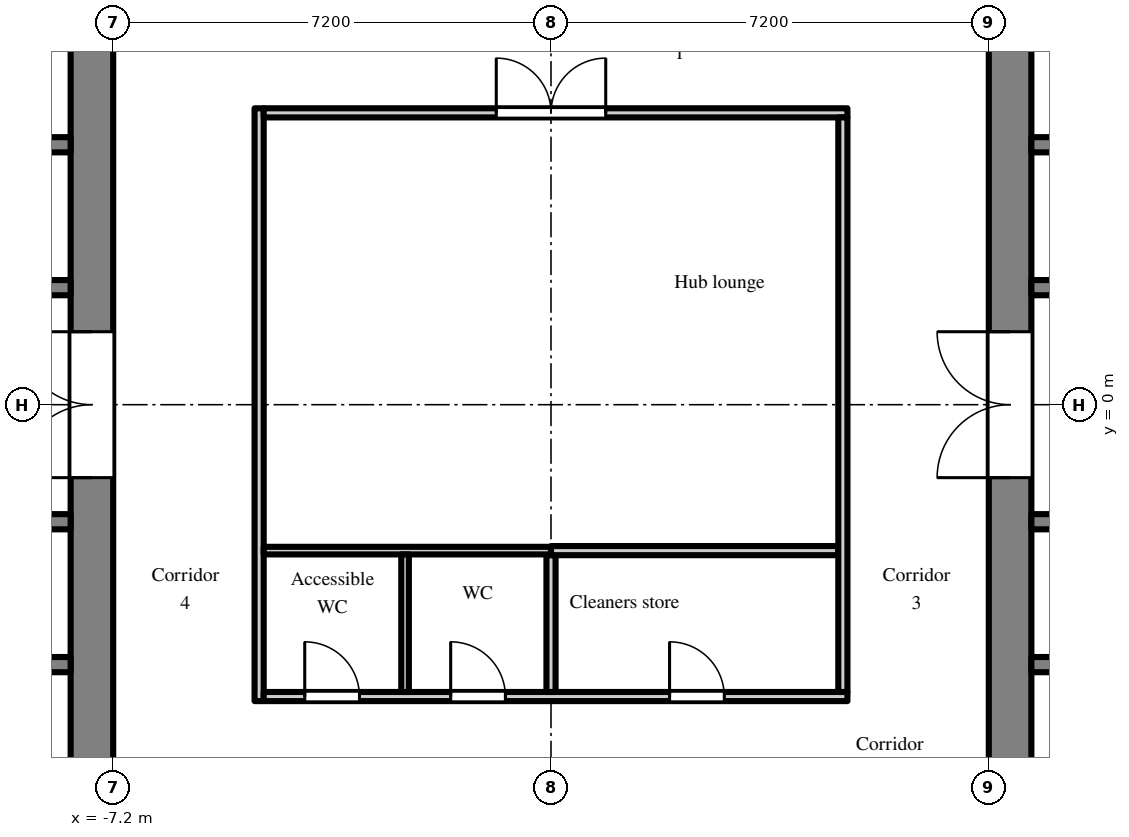
"""IFC4 building model, lengths in metres.
Left out: names, types, materials, properties, quantities, classifications, styles, units other than length and angle.
Written with IfcOpenShell. Run it as: python <this file> out.ifc"""

import sys

from ifc_helpers import new_model, si_unit, direction, frame, frame_2d, origin, place, context, subcontext, project, spatial, rectangle, extrude, element, fill, save


model = new_model("IFC4")
c1 = context("Model", 3, precision=1e-05, world=origin(), true_north=direction((0.0, 1.0)))
c2 = subcontext(c1, "Body", "Model", "MODEL_VIEW")
j1 = project(units=[si_unit("LENGTHUNIT", "METRE"), si_unit("PLANEANGLEUNIT", "RADIAN")], contexts=[c1])
p1 = place(None, origin())
s1 = spatial("IfcSite", under=j1, at=p1, CompositionType="ELEMENT")
p2 = place(p1, origin())
s2 = spatial("IfcBuilding", under=s1, at=p2, CompositionType="ELEMENT")
p3 = place(p2, frame((0.0, 0.0, 123.3)))
s3 = spatial("IfcBuildingStorey", under=s2, at=p3, CompositionType="ELEMENT", Elevation=123.3)
p4 = place(p3, frame((7.55, -7.2, 0.0), z_axis=(0.0, 0.0, 1.0), x_axis=(0.0, 1.0, 0.0)))
e1 = element("IfcWall", 1, at=p4, inside=s3, PredefinedType="SHEAR", context=c2, shape_type="SweptSolid", body=[
    extrude(rectangle(XDim=14.4, YDim=0.7, at=frame_2d((7.2, 0.0))), origin(), (0.0, 0.0, 1.0), 2.6),
])
p5 = place(p4, frame((6.0, 0.0, 0.0)))
e2 = element("IfcOpeningElement", 2, at=p5, cuts=e1, PredefinedType="OPENING", context=c2, shape_type="SweptSolid", body=[
    extrude(rectangle(XDim=2.4, YDim=2.2, at=frame_2d((1.2, 1.1))), frame((0.0, 0.36, 0.0), z_axis=(0.0, -1.0, 0.0), x_axis=(1.0, 0.0, 0.0)), (0.0, 0.0, 1.0), 0.72),
])
p6 = place(p3, frame((7.9, 1.925, 0.0), z_axis=(0.0, 0.0, 1.0), x_axis=(1.0, 0.0, 0.0)))
e3 = element("IfcWall", 3, at=p6, inside=s3, PredefinedType="SHEAR", context=c2, shape_type="SweptSolid", body=[
    extrude(rectangle(XDim=12.95, YDim=0.25, at=frame_2d((6.475, 0.0))), origin(), (0.0, 0.0, 1.0), 2.6),
])
p7 = place(p6, frame((4.825, 0.0, 0.0)))
e4 = element("IfcOpeningElement", 4, at=p7, cuts=e3, PredefinedType="OPENING", context=c2, shape_type="SweptSolid", body=[
    extrude(rectangle(XDim=1.1, YDim=2.1, at=frame_2d((0.55, 1.05))), frame((0.0, 0.135, 0.0), z_axis=(0.0, -1.0, 0.0), x_axis=(1.0, 0.0, 0.0)), (0.0, 0.0, 1.0), 0.27),
])
p8 = place(p6, frame((7.025, 0.0, 0.0)))
e5 = element("IfcOpeningElement", 5, at=p8, cuts=e3, PredefinedType="OPENING", context=c2, shape_type="SweptSolid", body=[
    extrude(rectangle(XDim=1.1, YDim=2.1, at=frame_2d((0.55, 1.05))), frame((0.0, 0.135, 0.0), z_axis=(0.0, -1.0, 0.0), x_axis=(1.0, 0.0, 0.0)), (0.0, 0.0, 1.0), 0.27),
])
p9 = place(p6, frame((9.225, 0.0, 0.0)))
e6 = element("IfcOpeningElement", 6, at=p9, cuts=e3, PredefinedType="OPENING", context=c2, shape_type="SweptSolid", body=[
    extrude(rectangle(XDim=1.1, YDim=2.1, at=frame_2d((0.55, 1.05))), frame((0.0, 0.135, 0.0), z_axis=(0.0, -1.0, 0.0), x_axis=(1.0, 0.0, 0.0)), (0.0, 0.0, 1.0), 0.27),
])
p10 = place(p6, frame((0.525, 0.0, 0.0)))
e7 = element("IfcOpeningElement", 7, at=p10, cuts=e3, PredefinedType="OPENING", context=c2, shape_type="SweptSolid", body=[
    extrude(rectangle(XDim=0.9, YDim=2.1, at=frame_2d((0.45, 1.05))), frame((0.0, 0.135, 0.0), z_axis=(0.0, -1.0, 0.0), x_axis=(1.0, 0.0, 0.0)), (0.0, 0.0, 1.0), 0.27),
])
p11 = place(p6, frame((2.625, 0.0, 0.0)))
e8 = element("IfcOpeningElement", 8, at=p11, cuts=e3, PredefinedType="OPENING", context=c2, shape_type="SweptSolid", body=[
    extrude(rectangle(XDim=1.1, YDim=2.1, at=frame_2d((0.55, 1.05))), frame((0.0, 0.135, 0.0), z_axis=(0.0, -1.0, 0.0), x_axis=(1.0, 0.0, 0.0)), (0.0, 0.0, 1.0), 0.27),
])
p12 = place(p6, frame((11.525, 0.0, 0.0)))
e9 = element("IfcOpeningElement", 9, at=p12, cuts=e3, PredefinedType="OPENING", context=c2, shape_type="SweptSolid", body=[
    extrude(rectangle(XDim=0.9, YDim=2.1, at=frame_2d((0.45, 1.05))), frame((0.0, 0.135, 0.0), z_axis=(0.0, -1.0, 0.0), x_axis=(1.0, 0.0, 0.0)), (0.0, 0.0, 1.0), 0.27),
])
p13 = place(p3, frame((7.9, 4.275, 0.0), z_axis=(0.0, 0.0, 1.0), x_axis=(1.0, 0.0, 0.0)))
e10 = element("IfcWall", 10, at=p13, inside=s3, PredefinedType="SHEAR", context=c2, shape_type="SweptSolid", body=[
    extrude(rectangle(XDim=1.95, YDim=0.25, at=frame_2d((0.975, 0.0))), origin(), (0.0, 0.0, 1.0), 2.6),
])
p14 = place(p3, frame((7.9, -1.925, 0.0), z_axis=(0.0, 0.0, 1.0), x_axis=(1.0, 0.0, 0.0)))
e11 = element("IfcWall", 11, at=p14, inside=s3, PredefinedType="SHEAR", context=c2, shape_type="SweptSolid", body=[
    extrude(rectangle(XDim=12.95, YDim=0.25, at=frame_2d((6.475, 0.0))), origin(), (0.0, 0.0, 1.0), 2.6),
])
p15 = place(p14, frame((0.525, 0.0, 0.0)))
e12 = element("IfcOpeningElement", 12, at=p15, cuts=e11, PredefinedType="OPENING", context=c2, shape_type="SweptSolid", body=[
    extrude(rectangle(XDim=0.9, YDim=2.1, at=frame_2d((0.45, 1.05))), frame((0.0, 0.135, 0.0), z_axis=(0.0, -1.0, 0.0), x_axis=(1.0, 0.0, 0.0)), (0.0, 0.0, 1.0), 0.27),
])
p16 = place(p14, frame((2.625, 0.0, 0.0)))
e13 = element("IfcOpeningElement", 13, at=p16, cuts=e11, PredefinedType="OPENING", context=c2, shape_type="SweptSolid", body=[
    extrude(rectangle(XDim=1.1, YDim=2.1, at=frame_2d((0.55, 1.05))), frame((0.0, 0.135, 0.0), z_axis=(0.0, -1.0, 0.0), x_axis=(1.0, 0.0, 0.0)), (0.0, 0.0, 1.0), 0.27),
])
p17 = place(p14, frame((4.925, 0.0, 0.0)))
e14 = element("IfcOpeningElement", 14, at=p17, cuts=e11, PredefinedType="OPENING", context=c2, shape_type="SweptSolid", body=[
    extrude(rectangle(XDim=0.9, YDim=2.1, at=frame_2d((0.45, 1.05))), frame((0.0, 0.135, 0.0), z_axis=(0.0, -1.0, 0.0), x_axis=(1.0, 0.0, 0.0)), (0.0, 0.0, 1.0), 0.27),
])
p18 = place(p14, frame((8.225, 0.0, 0.0)))
e15 = element("IfcOpeningElement", 15, at=p18, cuts=e11, PredefinedType="OPENING", context=c2, shape_type="SweptSolid", body=[
    extrude(rectangle(XDim=0.9, YDim=2.1, at=frame_2d((0.45, 1.05))), frame((0.0, 0.135, 0.0), z_axis=(0.0, -1.0, 0.0), x_axis=(1.0, 0.0, 0.0)), (0.0, 0.0, 1.0), 0.27),
])
p19 = place(p14, frame((11.525, 0.0, 0.0)))
e16 = element("IfcOpeningElement", 16, at=p19, cuts=e11, PredefinedType="OPENING", context=c2, shape_type="SweptSolid", body=[
    extrude(rectangle(XDim=0.9, YDim=2.1, at=frame_2d((0.45, 1.05))), frame((0.0, 0.135, 0.0), z_axis=(0.0, -1.0, 0.0), x_axis=(1.0, 0.0, 0.0)), (0.0, 0.0, 1.0), 0.27),
])
p20 = place(p3, frame((7.9, -4.275, 0.0), z_axis=(0.0, 0.0, 1.0), x_axis=(1.0, 0.0, 0.0)))
e17 = element("IfcWall", 17, at=p20, inside=s3, PredefinedType="SHEAR", context=c2, shape_type="SweptSolid", body=[
    extrude(rectangle(XDim=1.95, YDim=0.25, at=frame_2d((0.975, 0.0))), origin(), (0.0, 0.0, 1.0), 2.6),
])
p21 = place(p3, frame((-7.55, -7.2, 0.0), z_axis=(0.0, 0.0, 1.0), x_axis=(0.0, 1.0, 0.0)))
e18 = element("IfcWall", 18, at=p21, inside=s3, PredefinedType="SHEAR", context=c2, shape_type="SweptSolid", body=[
    extrude(rectangle(XDim=14.4, YDim=0.7, at=frame_2d((7.2, 0.0))), origin(), (0.0, 0.0, 1.0), 2.6),
])
p22 = place(p21, frame((6.0, 0.0, 0.0)))
e19 = element("IfcOpeningElement", 19, at=p22, cuts=e18, PredefinedType="OPENING", context=c2, shape_type="SweptSolid", body=[
    extrude(rectangle(XDim=2.4, YDim=2.2, at=frame_2d((1.2, 1.1))), frame((0.0, 0.36, 0.0), z_axis=(0.0, -1.0, 0.0), x_axis=(1.0, 0.0, 0.0)), (0.0, 0.0, 1.0), 0.72),
])
p23 = place(p3, frame((-7.9, 1.925, 0.0), z_axis=(0.0, 0.0, 1.0), x_axis=(-1.0, 0.0, 0.0)))
e20 = element("IfcWall", 20, at=p23, inside=s3, PredefinedType="SHEAR", context=c2, shape_type="SweptSolid", body=[
    extrude(rectangle(XDim=12.95, YDim=0.25, at=frame_2d((6.475, 0.0))), origin(), (0.0, 0.0, 1.0), 2.6),
])
p24 = place(p23, frame((4.825, 0.0, 0.0)))
e21 = element("IfcOpeningElement", 21, at=p24, cuts=e20, PredefinedType="OPENING", context=c2, shape_type="SweptSolid", body=[
    extrude(rectangle(XDim=1.1, YDim=2.1, at=frame_2d((0.55, 1.05))), frame((0.0, 0.135, 0.0), z_axis=(0.0, -1.0, 0.0), x_axis=(1.0, 0.0, 0.0)), (0.0, 0.0, 1.0), 0.27),
])
p25 = place(p23, frame((7.025, 0.0, 0.0)))
e22 = element("IfcOpeningElement", 22, at=p25, cuts=e20, PredefinedType="OPENING", context=c2, shape_type="SweptSolid", body=[
    extrude(rectangle(XDim=1.1, YDim=2.1, at=frame_2d((0.55, 1.05))), frame((0.0, 0.135, 0.0), z_axis=(0.0, -1.0, 0.0), x_axis=(1.0, 0.0, 0.0)), (0.0, 0.0, 1.0), 0.27),
])
p26 = place(p23, frame((9.225, 0.0, 0.0)))
e23 = element("IfcOpeningElement", 23, at=p26, cuts=e20, PredefinedType="OPENING", context=c2, shape_type="SweptSolid", body=[
    extrude(rectangle(XDim=1.1, YDim=2.1, at=frame_2d((0.55, 1.05))), frame((0.0, 0.135, 0.0), z_axis=(0.0, -1.0, 0.0), x_axis=(1.0, 0.0, 0.0)), (0.0, 0.0, 1.0), 0.27),
])
p27 = place(p23, frame((0.525, 0.0, 0.0)))
e24 = element("IfcOpeningElement", 24, at=p27, cuts=e20, PredefinedType="OPENING", context=c2, shape_type="SweptSolid", body=[
    extrude(rectangle(XDim=0.9, YDim=2.1, at=frame_2d((0.45, 1.05))), frame((0.0, 0.135, 0.0), z_axis=(0.0, -1.0, 0.0), x_axis=(1.0, 0.0, 0.0)), (0.0, 0.0, 1.0), 0.27),
])
p28 = place(p23, frame((2.625, 0.0, 0.0)))
e25 = element("IfcOpeningElement", 25, at=p28, cuts=e20, PredefinedType="OPENING", context=c2, shape_type="SweptSolid", body=[
    extrude(rectangle(XDim=1.1, YDim=2.1, at=frame_2d((0.55, 1.05))), frame((0.0, 0.135, 0.0), z_axis=(0.0, -1.0, 0.0), x_axis=(1.0, 0.0, 0.0)), (0.0, 0.0, 1.0), 0.27),
])
p29 = place(p23, frame((11.525, 0.0, 0.0)))
e26 = element("IfcOpeningElement", 26, at=p29, cuts=e20, PredefinedType="OPENING", context=c2, shape_type="SweptSolid", body=[
    extrude(rectangle(XDim=0.9, YDim=2.1, at=frame_2d((0.45, 1.05))), frame((0.0, 0.135, 0.0), z_axis=(0.0, -1.0, 0.0), x_axis=(1.0, 0.0, 0.0)), (0.0, 0.0, 1.0), 0.27),
])
p30 = place(p3, frame((-7.9, 4.275, 0.0), z_axis=(0.0, 0.0, 1.0), x_axis=(-1.0, 0.0, 0.0)))
e27 = element("IfcWall", 27, at=p30, inside=s3, PredefinedType="SHEAR", context=c2, shape_type="SweptSolid", body=[
    extrude(rectangle(XDim=1.95, YDim=0.25, at=frame_2d((0.975, 0.0))), origin(), (0.0, 0.0, 1.0), 2.6),
])
p31 = place(p3, frame((-7.9, -1.925, 0.0), z_axis=(0.0, 0.0, 1.0), x_axis=(-1.0, 0.0, 0.0)))
e28 = element("IfcWall", 28, at=p31, inside=s3, PredefinedType="SHEAR", context=c2, shape_type="SweptSolid", body=[
    extrude(rectangle(XDim=12.95, YDim=0.25, at=frame_2d((6.475, 0.0))), origin(), (0.0, 0.0, 1.0), 2.6),
])
p32 = place(p31, frame((0.525, 0.0, 0.0)))
e29 = element("IfcOpeningElement", 29, at=p32, cuts=e28, PredefinedType="OPENING", context=c2, shape_type="SweptSolid", body=[
    extrude(rectangle(XDim=0.9, YDim=2.1, at=frame_2d((0.45, 1.05))), frame((0.0, 0.135, 0.0), z_axis=(0.0, -1.0, 0.0), x_axis=(1.0, 0.0, 0.0)), (0.0, 0.0, 1.0), 0.27),
])
p33 = place(p31, frame((2.625, 0.0, 0.0)))
e30 = element("IfcOpeningElement", 30, at=p33, cuts=e28, PredefinedType="OPENING", context=c2, shape_type="SweptSolid", body=[
    extrude(rectangle(XDim=1.1, YDim=2.1, at=frame_2d((0.55, 1.05))), frame((0.0, 0.135, 0.0), z_axis=(0.0, -1.0, 0.0), x_axis=(1.0, 0.0, 0.0)), (0.0, 0.0, 1.0), 0.27),
])
p34 = place(p31, frame((4.925, 0.0, 0.0)))
e31 = element("IfcOpeningElement", 31, at=p34, cuts=e28, PredefinedType="OPENING", context=c2, shape_type="SweptSolid", body=[
    extrude(rectangle(XDim=0.9, YDim=2.1, at=frame_2d((0.45, 1.05))), frame((0.0, 0.135, 0.0), z_axis=(0.0, -1.0, 0.0), x_axis=(1.0, 0.0, 0.0)), (0.0, 0.0, 1.0), 0.27),
])
p35 = place(p31, frame((8.225, 0.0, 0.0)))
e32 = element("IfcOpeningElement", 32, at=p35, cuts=e28, PredefinedType="OPENING", context=c2, shape_type="SweptSolid", body=[
    extrude(rectangle(XDim=0.9, YDim=2.1, at=frame_2d((0.45, 1.05))), frame((0.0, 0.135, 0.0), z_axis=(0.0, -1.0, 0.0), x_axis=(1.0, 0.0, 0.0)), (0.0, 0.0, 1.0), 0.27),
])
p36 = place(p31, frame((11.525, 0.0, 0.0)))
e33 = element("IfcOpeningElement", 33, at=p36, cuts=e28, PredefinedType="OPENING", context=c2, shape_type="SweptSolid", body=[
    extrude(rectangle(XDim=0.9, YDim=2.1, at=frame_2d((0.45, 1.05))), frame((0.0, 0.135, 0.0), z_axis=(0.0, -1.0, 0.0), x_axis=(1.0, 0.0, 0.0)), (0.0, 0.0, 1.0), 0.27),
])
p37 = place(p3, frame((-7.9, -4.275, 0.0), z_axis=(0.0, 0.0, 1.0), x_axis=(-1.0, 0.0, 0.0)))
e34 = element("IfcWall", 34, at=p37, inside=s3, PredefinedType="SHEAR", context=c2, shape_type="SweptSolid", body=[
    extrude(rectangle(XDim=1.95, YDim=0.25, at=frame_2d((0.975, 0.0))), origin(), (0.0, 0.0, 1.0), 2.6),
])
p38 = place(p3, frame((-4.8, -4.875, 0.0), z_axis=(0.0, 0.0, 1.0), x_axis=(0.0, 1.0, 0.0)))
e35 = element("IfcWall", 35, at=p38, inside=s3, PredefinedType="PARTITIONING", context=c2, shape_type="SweptSolid", body=[
    extrude(rectangle(XDim=9.75, YDim=0.15, at=frame_2d((4.875, 0.0))), origin(), (0.0, 0.0, 1.0), 2.6),
])
p39 = place(p3, frame((-4.725, -4.8, 0.0), z_axis=(0.0, 0.0, 1.0), x_axis=(1.0, 0.0, 0.0)))
e36 = element("IfcWall", 36, at=p39, inside=s3, PredefinedType="PARTITIONING", context=c2, shape_type="SweptSolid", body=[
    extrude(rectangle(XDim=9.6, YDim=0.15, at=frame_2d((4.8, 0.0))), origin(), (0.0, 0.0, 1.0), 2.6),
])
p40 = place(p39, frame((0.675, 0.0, 0.0)))
e37 = element("IfcOpeningElement", 37, at=p40, cuts=e36, PredefinedType="OPENING", context=c2, shape_type="SweptSolid", body=[
    extrude(rectangle(XDim=0.9, YDim=2.1, at=frame_2d((0.45, 1.05))), frame((0.0, 0.085, 0.0), z_axis=(0.0, -1.0, 0.0), x_axis=(1.0, 0.0, 0.0)), (0.0, 0.0, 1.0), 0.17),
])
p41 = place(p39, frame((3.075, 0.0, 0.0)))
e38 = element("IfcOpeningElement", 38, at=p41, cuts=e36, PredefinedType="OPENING", context=c2, shape_type="SweptSolid", body=[
    extrude(rectangle(XDim=0.9, YDim=2.1, at=frame_2d((0.45, 1.05))), frame((0.0, 0.085, 0.0), z_axis=(0.0, -1.0, 0.0), x_axis=(1.0, 0.0, 0.0)), (0.0, 0.0, 1.0), 0.17),
])
p42 = place(p39, frame((6.675, 0.0, 0.0)))
e39 = element("IfcOpeningElement", 39, at=p42, cuts=e36, PredefinedType="OPENING", context=c2, shape_type="SweptSolid", body=[
    extrude(rectangle(XDim=0.9, YDim=2.1, at=frame_2d((0.45, 1.05))), frame((0.0, 0.085, 0.0), z_axis=(0.0, -1.0, 0.0), x_axis=(1.0, 0.0, 0.0)), (0.0, 0.0, 1.0), 0.17),
])
p43 = place(p3, frame((-4.725, -2.4, 0.0), z_axis=(0.0, 0.0, 1.0), x_axis=(1.0, 0.0, 0.0)))
e40 = element("IfcWall", 40, at=p43, inside=s3, PredefinedType="PARTITIONING", context=c2, shape_type="SweptSolid", body=[
    extrude(rectangle(XDim=4.725, YDim=0.125, at=frame_2d((2.363, 0.0))), origin(), (0.0, 0.0, 1.0), 2.6),
])
p44 = place(p3, frame((-4.725, 4.8, 0.0), z_axis=(0.0, 0.0, 1.0), x_axis=(1.0, 0.0, 0.0)))
e41 = element("IfcWall", 41, at=p44, inside=s3, PredefinedType="PARTITIONING", context=c2, shape_type="SweptSolid", body=[
    extrude(rectangle(XDim=9.6, YDim=0.15, at=frame_2d((4.8, 0.0))), origin(), (0.0, 0.0, 1.0), 2.6),
])
p45 = place(p44, frame((3.825, 0.0, 0.0)))
e42 = element("IfcOpeningElement", 42, at=p45, cuts=e41, PredefinedType="OPENING", context=c2, shape_type="SweptSolid", body=[
    extrude(rectangle(XDim=1.8, YDim=2.1, at=frame_2d((0.9, 1.05))), frame((0.0, 0.085, 0.0), z_axis=(0.0, -1.0, 0.0), x_axis=(1.0, 0.0, 0.0)), (0.0, 0.0, 1.0), 0.17),
])
p46 = place(p3, frame((-2.4, -4.725, 0.0), z_axis=(0.0, 0.0, 1.0), x_axis=(0.0, 1.0, 0.0)))
e43 = element("IfcWall", 43, at=p46, inside=s3, PredefinedType="PARTITIONING", context=c2, shape_type="SweptSolid", body=[
    extrude(rectangle(XDim=2.263, YDim=0.125, at=frame_2d((1.131, 0.0))), origin(), (0.0, 0.0, 1.0), 2.6),
])
p47 = place(p3, frame((0.0, -4.725, 0.0), z_axis=(0.0, 0.0, 1.0), x_axis=(0.0, 1.0, 0.0)))
e44 = element("IfcWall", 44, at=p47, inside=s3, PredefinedType="PARTITIONING", context=c2, shape_type="SweptSolid", body=[
    extrude(rectangle(XDim=2.25, YDim=0.15, at=frame_2d((1.125, 0.0))), origin(), (0.0, 0.0, 1.0), 2.6),
])
p48 = place(p3, frame((0.0, -2.4, 0.0), z_axis=(0.0, 0.0, 1.0), x_axis=(1.0, 0.0, 0.0)))
e45 = element("IfcWall", 45, at=p48, inside=s3, PredefinedType="PARTITIONING", context=c2, shape_type="SweptSolid", body=[
    extrude(rectangle(XDim=4.725, YDim=0.15, at=frame_2d((2.363, 0.0))), origin(), (0.0, 0.0, 1.0), 2.6),
])
p49 = place(p3, frame((4.8, -4.725, 0.0), z_axis=(0.0, 0.0, 1.0), x_axis=(0.0, 1.0, 0.0)))
e46 = element("IfcWall", 46, at=p49, inside=s3, PredefinedType="PARTITIONING", context=c2, shape_type="SweptSolid", body=[
    extrude(rectangle(XDim=9.45, YDim=0.15, at=frame_2d((4.725, 0.0))), origin(), (0.0, 0.0, 1.0), 2.6),
])
p50 = place(p5, origin())
e47 = element("IfcDoor", 47, at=p50, inside=s3, OperationType="DOUBLE_DOOR_DOUBLE_SWING", PredefinedType="DOOR", context=c2, shape_type="SweptSolid", body=[
    extrude(rectangle(XDim=2.4, YDim=2.2, at=frame_2d((1.2, 1.1))), frame((0.0, 0.025, 0.0), z_axis=(0.0, -1.0, 0.0), x_axis=(1.0, 0.0, 0.0)), (0.0, 0.0, 1.0), 0.05),
])
fill(e2, e47)
p51 = place(p22, origin())
e48 = element("IfcDoor", 48, at=p51, inside=s3, OperationType="DOUBLE_DOOR_DOUBLE_SWING", PredefinedType="DOOR", context=c2, shape_type="SweptSolid", body=[
    extrude(rectangle(XDim=2.4, YDim=2.2, at=frame_2d((1.2, 1.1))), frame((0.0, 0.025, 0.0), z_axis=(0.0, -1.0, 0.0), x_axis=(1.0, 0.0, 0.0)), (0.0, 0.0, 1.0), 0.05),
])
fill(e19, e48)
p52 = place(p40, origin())
e49 = element("IfcDoor", 49, at=p52, inside=s3, OperationType="SINGLE_SWING_LEFT", PredefinedType="DOOR", context=c2, shape_type="SweptSolid", body=[
    extrude(rectangle(XDim=0.9, YDim=2.1, at=frame_2d((0.45, 1.05))), frame((0.0, 0.025, 0.0), z_axis=(0.0, -1.0, 0.0), x_axis=(1.0, 0.0, 0.0)), (0.0, 0.0, 1.0), 0.05),
])
fill(e37, e49)
p53 = place(p41, origin())
e50 = element("IfcDoor", 50, at=p53, inside=s3, OperationType="SINGLE_SWING_LEFT", PredefinedType="DOOR", context=c2, shape_type="SweptSolid", body=[
    extrude(rectangle(XDim=0.9, YDim=2.1, at=frame_2d((0.45, 1.05))), frame((0.0, 0.025, 0.0), z_axis=(0.0, -1.0, 0.0), x_axis=(1.0, 0.0, 0.0)), (0.0, 0.0, 1.0), 0.05),
])
fill(e38, e50)
p54 = place(p42, origin())
e51 = element("IfcDoor", 51, at=p54, inside=s3, OperationType="SINGLE_SWING_LEFT", PredefinedType="DOOR", context=c2, shape_type="SweptSolid", body=[
    extrude(rectangle(XDim=0.9, YDim=2.1, at=frame_2d((0.45, 1.05))), frame((0.0, 0.025, 0.0), z_axis=(0.0, -1.0, 0.0), x_axis=(1.0, 0.0, 0.0)), (0.0, 0.0, 1.0), 0.05),
])
fill(e39, e51)
p55 = place(p45, origin())
e52 = element("IfcDoor", 52, at=p55, inside=s3, OperationType="DOUBLE_DOOR_DOUBLE_SWING", PredefinedType="DOOR", context=c2, shape_type="SweptSolid", body=[
    extrude(rectangle(XDim=1.8, YDim=2.1, at=frame_2d((0.9, 1.05))), frame((0.0, 0.025, 0.0), z_axis=(0.0, -1.0, 0.0), x_axis=(1.0, 0.0, 0.0)), (0.0, 0.0, 1.0), 0.05),
])
fill(e42, e52)
save(model, sys.argv[1])
